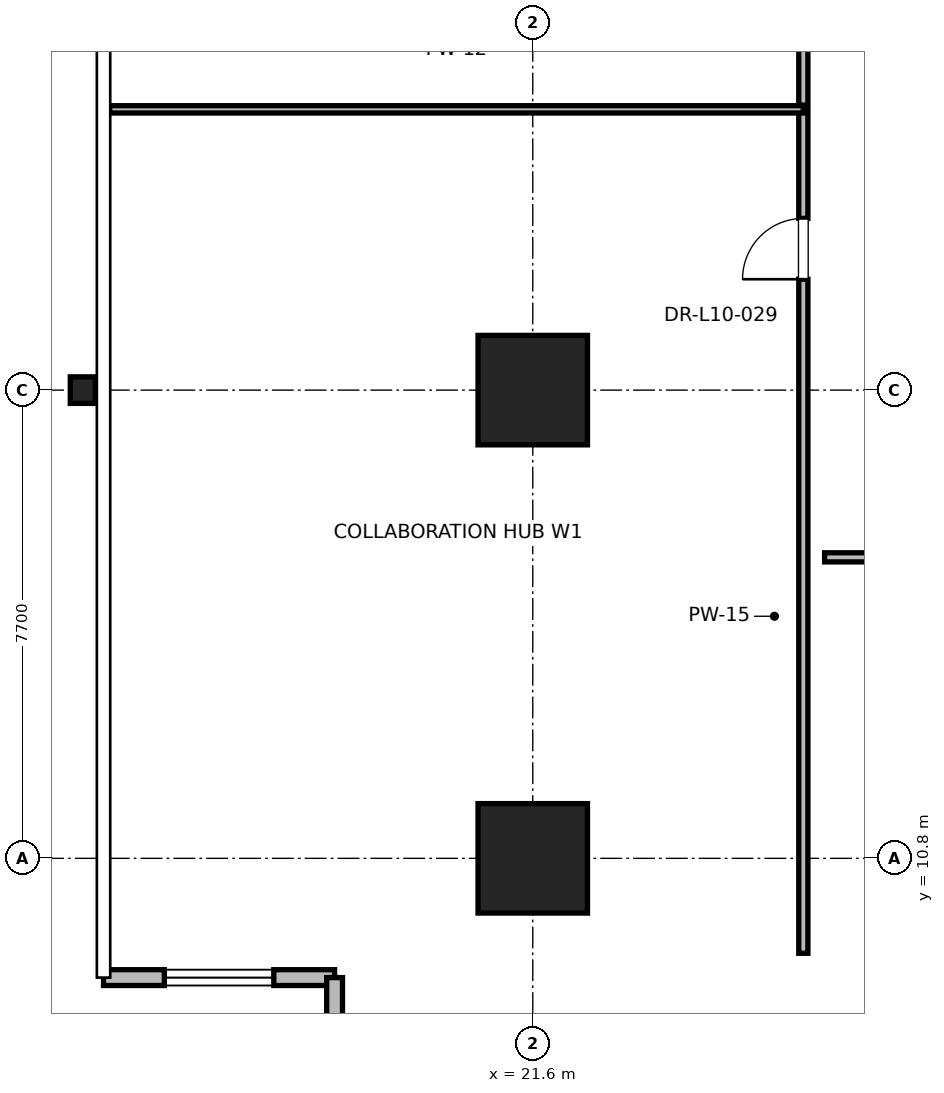
"""IFC4 building model, lengths in metres.
Left out: names, types, materials, properties, quantities, classifications, styles, units other than length and angle.
Written with IfcOpenShell. Run it as: python <this file> out.ifc"""

import sys

from ifc_helpers import new_model, si_unit, direction, frame, frame_2d, origin, origin_2d, place, context, subcontext, project, spatial, rectangle, i_section, extrude, element, fill, save


model = new_model("IFC4")
c1 = context("Model", 3, precision=1e-05, world=origin(), true_north=direction((0.0, 1.0)))
c2 = subcontext(c1, "Body", "Model", "MODEL_VIEW")
j1 = project(units=[si_unit("LENGTHUNIT", "METRE"), si_unit("PLANEANGLEUNIT", "RADIAN")], contexts=[c1])
p1 = place(None, origin())
s1 = spatial("IfcSite", under=j1, at=p1, CompositionType="ELEMENT")
p2 = place(p1, origin())
s2 = spatial("IfcBuilding", under=s1, at=p2, CompositionType="ELEMENT")
p3 = place(p2, frame((0.0, 0.0, 47.6)))
s3 = spatial("IfcBuildingStorey", under=s2, at=p3, CompositionType="ELEMENT", Elevation=47.6)
for number, where, z_axis, x_axis in (
    (1, (21.6, 18.5, 0.0), (0.0, 0.0, 1.0), (1.0, 0.0, 0.0)),
    (2, (21.6, 10.8, 0.0), (0.0, 0.0, 1.0), (1.0, 0.0, 0.0)),
):
    element("IfcColumn", number, at=place(p3, frame(where, z_axis=z_axis, x_axis=x_axis)), inside=s3, PredefinedType="COLUMN", context=c2, shape_type="SweptSolid", body=[
        extrude(rectangle(XDim=1.8, YDim=1.8, at=origin_2d()), origin(), (0.0, 0.0, 1.0), 4.0),
    ])
p4 = place(p3, frame((14.2, 18.5, 0.0), z_axis=(0.0, 0.0, 1.0), x_axis=(1.0, 0.0, 0.0)))
e3 = element("IfcColumn", 3, at=p4, inside=s3, PredefinedType="COLUMN", context=c2, shape_type="SweptSolid", body=[
    extrude(i_section(OverallWidth=0.412, OverallDepth=0.437, WebThickness=0.036, FlangeThickness=0.058, FilletRadius=0.015, at=origin_2d()), origin(), (0.0, 0.0, 1.0), 4.0),
])
p5 = place(p3, frame((14.541, 8.839, 0.0), z_axis=(0.0, 0.0, 1.0), x_axis=(1.0, 0.0, 0.0)))
e4 = element("IfcWall", 4, at=p5, inside=s3, PredefinedType="PARAPET", context=c2, shape_type="SweptSolid", body=[
    extrude(rectangle(XDim=3.8, YDim=0.26, at=frame_2d((1.9, 0.0))), origin(), (0.0, 0.0, 1.0), 3.76),
])
p6 = place(p5, frame((1.0, 0.0, 0.85)))
e5 = element("IfcOpeningElement", 5, at=p6, cuts=e4, PredefinedType="OPENING", context=c2, shape_type="SweptSolid", body=[
    extrude(rectangle(XDim=1.8, YDim=2.2, at=frame_2d((0.9, 1.1))), frame((0.0, 0.13, 0.0), z_axis=(0.0, -1.0, 0.0), x_axis=(1.0, 0.0, 0.0)), (0.0, 0.0, 1.0), 0.26),
])
p7 = place(p3, frame((18.341, 8.839, 0.0), z_axis=(0.0, 0.0, 1.0), x_axis=(0.0, -1.0, 0.0)))
e6 = element("IfcWall", 6, at=p7, inside=s3, PredefinedType="PARAPET", context=c2, shape_type="SweptSolid", body=[
    extrude(rectangle(XDim=3.4, YDim=0.26, at=frame_2d((1.7, 0.0))), origin(), (0.0, 0.0, 1.0), 3.76),
])
p8 = place(p3, frame((26.4, 15.75, 0.0), z_axis=(0.0, 0.0, 1.0), x_axis=(1.0, 0.0, 0.0)))
e7 = element("IfcWall", 7, at=p8, inside=s3, PredefinedType="PARTITIONING", context=c2, shape_type="SweptSolid", body=[
    extrude(rectangle(XDim=12.512, YDim=0.15, at=frame_2d((6.256, 0.0))), origin(), (0.0, 0.0, 1.0), 2.85),
])
p9 = place(p8, frame((5.771, 0.0, 0.0)))
e8 = element("IfcOpeningElement", 8, at=p9, cuts=e7, PredefinedType="OPENING", context=c2, shape_type="SweptSolid", body=[
    extrude(rectangle(XDim=1.0, YDim=2.15, at=frame_2d((0.5, 1.075))), frame((0.0, 0.075, 0.0), z_axis=(0.0, -1.0, 0.0), x_axis=(1.0, 0.0, 0.0)), (0.0, 0.0, 1.0), 0.15),
])
p10 = place(p3, frame((26.05, 9.239, 0.0), z_axis=(0.0, 0.0, 1.0), x_axis=(0.0, 1.0, 0.0)))
e9 = element("IfcWall", 9, at=p10, inside=s3, PredefinedType="PARTITIONING", context=c2, shape_type="SweptSolid", body=[
    extrude(rectangle(XDim=13.878, YDim=0.15, at=frame_2d((6.939, 0.0))), origin(), (0.0, 0.0, 1.0), 2.85),
])
p11 = place(p10, frame((11.085, 0.0, 0.0)))
e10 = element("IfcOpeningElement", 10, at=p11, cuts=e9, PredefinedType="OPENING", context=c2, shape_type="SweptSolid", body=[
    extrude(rectangle(XDim=1.0, YDim=2.15, at=frame_2d((0.5, 1.075))), frame((0.0, 0.075, 0.0), z_axis=(0.0, -1.0, 0.0), x_axis=(1.0, 0.0, 0.0)), (0.0, 0.0, 1.0), 0.15),
])
p12 = place(p3, frame((14.641, 23.117, 0.0), z_axis=(0.0, 0.0, 1.0), x_axis=(1.0, 0.0, 0.0)))
e11 = element("IfcWall", 11, at=p12, inside=s3, PredefinedType="PARTITIONING", context=c2, shape_type="SweptSolid", body=[
    extrude(rectangle(XDim=11.409, YDim=0.12, at=frame_2d((5.705, 0.0))), origin(), (0.0, 0.0, 1.0), 2.85),
])
p13 = place(p3, frame((26.05, 23.187, 0.0), z_axis=(0.0, 0.0, 1.0), x_axis=(0.0, 1.0, 0.0)))
e12 = element("IfcWall", 12, at=p13, inside=s3, PredefinedType="PARTITIONING", context=c2, shape_type="SweptSolid", body=[
    extrude(rectangle(XDim=22.574, YDim=0.15, at=frame_2d((11.287, 0.0))), origin(), (0.0, 0.0, 1.0), 2.85),
])
p14 = place(p13, frame((6.106, 0.0, 0.0)))
e13 = element("IfcOpeningElement", 13, at=p14, cuts=e12, PredefinedType="OPENING", context=c2, shape_type="SweptSolid", body=[
    extrude(rectangle(XDim=1.0, YDim=2.15, at=frame_2d((0.5, 1.075))), frame((0.0, 0.075, 0.0), z_axis=(0.0, -1.0, 0.0), x_axis=(1.0, 0.0, 0.0)), (0.0, 0.0, 1.0), 0.15),
])
p15 = place(p6, origin())
e14 = element("IfcWindow", 14, at=p15, inside=s3, PartitioningType="SINGLE_PANEL", PredefinedType="WINDOW", context=c2, shape_type="SweptSolid", body=[
    extrude(rectangle(XDim=1.8, YDim=2.2, at=frame_2d((0.9, 1.1))), frame((0.0, 0.03, 0.0), z_axis=(0.0, -1.0, 0.0), x_axis=(1.0, 0.0, 0.0)), (0.0, 0.0, 1.0), 0.06),
])
fill(e5, e14)
p16 = place(p11, origin())
e15 = element("IfcDoor", 15, at=p16, inside=s3, OperationType="SINGLE_SWING_LEFT", PredefinedType="DOOR", context=c2, shape_type="SweptSolid", body=[
    extrude(rectangle(XDim=1.0, YDim=2.15, at=frame_2d((0.5, 1.075))), frame((0.0, 0.025, 0.0), z_axis=(0.0, -1.0, 0.0), x_axis=(1.0, 0.0, 0.0)), (0.0, 0.0, 1.0), 0.05),
])
fill(e10, e15)
save(model, sys.argv[1])
